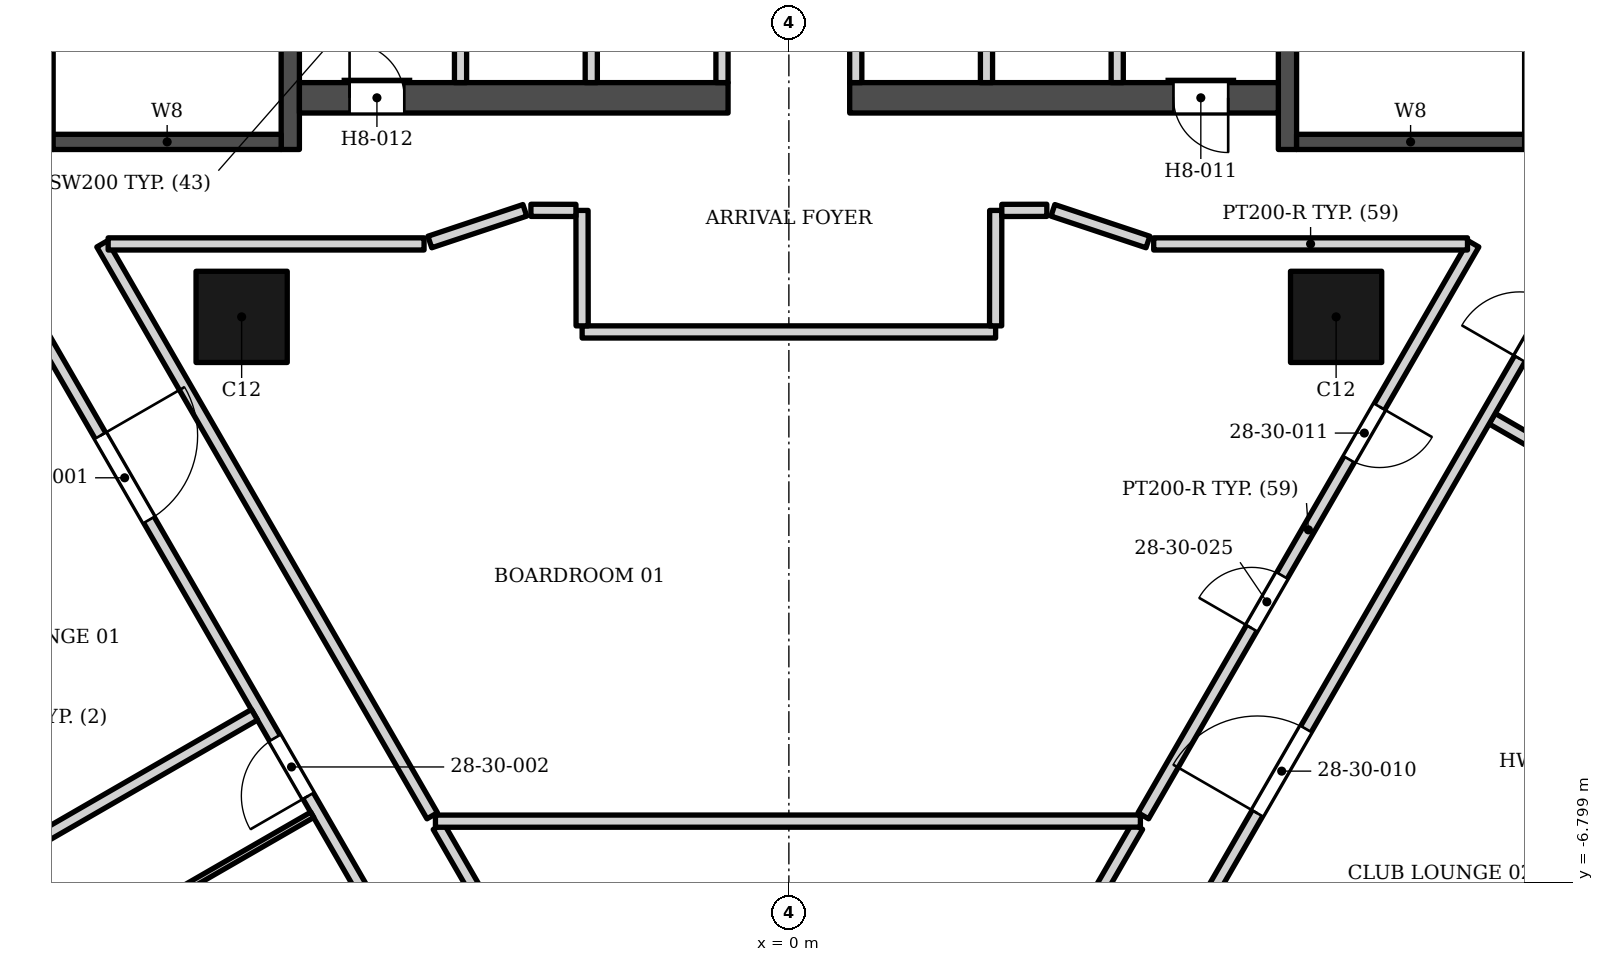
"""IFC4 building model, lengths in metres.
Left out: names, types, materials, properties, quantities, classifications, styles, units other than length and angle.
Written with IfcOpenShell. Run it as: python <this file> out.ifc"""

import sys

from ifc_helpers import new_model, si_unit, direction, frame, frame_2d, origin, origin_2d, place, context, subcontext, project, spatial, rectangle, extrude, element, fill, save


model = new_model("IFC4")
c1 = context("Model", 3, precision=1e-05, world=origin(), true_north=direction((0.0, 1.0)))
c2 = subcontext(c1, "Body", "Model", "MODEL_VIEW")
j1 = project(units=[si_unit("LENGTHUNIT", "METRE"), si_unit("PLANEANGLEUNIT", "RADIAN")], contexts=[c1])
p1 = place(None, origin())
s1 = spatial("IfcSite", under=j1, at=p1, CompositionType="ELEMENT")
p2 = place(p1, origin())
s2 = spatial("IfcBuilding", under=s1, at=p2, CompositionType="ELEMENT")
p3 = place(p2, frame((0.0, 0.0, 122.4)))
s3 = spatial("IfcBuildingStorey", under=s2, at=p3, CompositionType="ELEMENT", Elevation=122.4)
p4 = place(p3, frame((-12.35, 5.253, 0.0), z_axis=(0.0, 0.0, 1.0), x_axis=(0.0, 1.0, 0.0)))
e1 = element("IfcWall", 1, at=p4, inside=s3, PredefinedType="SHEAR", context=c2, shape_type="SweptSolid", body=[
    extrude(rectangle(XDim=13.3, YDim=0.5, at=frame_2d((6.65, 0.0))), origin(), (0.0, 0.0, 1.0), 3.4),
])
p5 = place(p3, frame((-8.2, 5.253, 0.0), z_axis=(0.0, 0.0, 1.0), x_axis=(0.0, 1.0, 0.0)))
e2 = element("IfcWall", 2, at=p5, inside=s3, PredefinedType="SHEAR", context=c2, shape_type="SweptSolid", body=[
    extrude(rectangle(XDim=13.3, YDim=0.3, at=frame_2d((6.65, 0.0))), origin(), (0.0, 0.0, 1.0), 3.4),
])
p6 = place(p5, frame((7.1, 0.0, 0.0)))
e3 = element("IfcOpeningElement", 3, at=p6, cuts=e2, PredefinedType="OPENING", context=c2, shape_type="SweptSolid", body=[
    extrude(rectangle(XDim=1.4, YDim=2.1, at=frame_2d((0.7, 1.05))), frame((0.0, 0.16, 0.0), z_axis=(0.0, -1.0, 0.0), x_axis=(1.0, 0.0, 0.0)), (0.0, 0.0, 1.0), 0.32),
])
p7 = place(p5, frame((5.05, 0.0, 0.0)))
e4 = element("IfcOpeningElement", 4, at=p7, cuts=e2, PredefinedType="OPENING", context=c2, shape_type="SweptSolid", body=[
    extrude(rectangle(XDim=1.4, YDim=2.1, at=frame_2d((0.7, 1.05))), frame((0.0, 0.16, 0.0), z_axis=(0.0, -1.0, 0.0), x_axis=(1.0, 0.0, 0.0)), (0.0, 0.0, 1.0), 0.32),
])
p8 = place(p3, frame((-12.1, 5.378, 0.0), z_axis=(0.0, 0.0, 1.0), x_axis=(1.0, 0.0, 0.0)))
e5 = element("IfcWall", 5, at=p8, inside=s3, PredefinedType="SHEAR", context=c2, shape_type="SweptSolid", body=[
    extrude(rectangle(XDim=3.75, YDim=0.25, at=frame_2d((1.875, 0.0))), origin(), (0.0, 0.0, 1.0), 3.4),
])
p9 = place(p3, frame((8.2, 5.253, 0.0), z_axis=(0.0, 0.0, 1.0), x_axis=(0.0, 1.0, 0.0)))
e6 = element("IfcWall", 6, at=p9, inside=s3, PredefinedType="SHEAR", context=c2, shape_type="SweptSolid", body=[
    extrude(rectangle(XDim=13.3, YDim=0.3, at=frame_2d((6.65, 0.0))), origin(), (0.0, 0.0, 1.0), 3.4),
])
p10 = place(p9, frame((7.1, 0.0, 0.0)))
e7 = element("IfcOpeningElement", 7, at=p10, cuts=e6, PredefinedType="OPENING", context=c2, shape_type="SweptSolid", body=[
    extrude(rectangle(XDim=1.4, YDim=2.1, at=frame_2d((0.7, 1.05))), frame((0.0, 0.16, 0.0), z_axis=(0.0, -1.0, 0.0), x_axis=(1.0, 0.0, 0.0)), (0.0, 0.0, 1.0), 0.32),
])
p11 = place(p9, frame((5.05, 0.0, 0.0)))
e8 = element("IfcOpeningElement", 8, at=p11, cuts=e6, PredefinedType="OPENING", context=c2, shape_type="SweptSolid", body=[
    extrude(rectangle(XDim=1.4, YDim=2.1, at=frame_2d((0.7, 1.05))), frame((0.0, 0.16, 0.0), z_axis=(0.0, -1.0, 0.0), x_axis=(1.0, 0.0, 0.0)), (0.0, 0.0, 1.0), 0.32),
])
p12 = place(p3, frame((8.35, 5.378, 0.0), z_axis=(0.0, 0.0, 1.0), x_axis=(1.0, 0.0, 0.0)))
e9 = element("IfcWall", 9, at=p12, inside=s3, PredefinedType="SHEAR", context=c2, shape_type="SweptSolid", body=[
    extrude(rectangle(XDim=3.75, YDim=0.25, at=frame_2d((1.875, 0.0))), origin(), (0.0, 0.0, 1.0), 3.4),
])
p13 = place(p3, frame((-8.05, 6.103, 0.0), z_axis=(0.0, 0.0, 1.0), x_axis=(1.0, 0.0, 0.0)))
e10 = element("IfcWall", 10, at=p13, inside=s3, PredefinedType="SHEAR", context=c2, shape_type="SweptSolid", body=[
    extrude(rectangle(XDim=7.05, YDim=0.5, at=frame_2d((3.525, 0.0))), origin(), (0.0, 0.0, 1.0), 3.4),
])
p14 = place(p13, frame((0.825, 0.0, 0.0)))
e11 = element("IfcOpeningElement", 11, at=p14, cuts=e10, PredefinedType="OPENING", context=c2, shape_type="SweptSolid", body=[
    extrude(rectangle(XDim=0.9, YDim=2.1, at=frame_2d((0.45, 1.05))), frame((0.0, 0.26, 0.0), z_axis=(0.0, -1.0, 0.0), x_axis=(1.0, 0.0, 0.0)), (0.0, 0.0, 1.0), 0.52),
])
p15 = place(p3, frame((1.0, 6.103, 0.0), z_axis=(0.0, 0.0, 1.0), x_axis=(1.0, 0.0, 0.0)))
e12 = element("IfcWall", 12, at=p15, inside=s3, PredefinedType="SHEAR", context=c2, shape_type="SweptSolid", body=[
    extrude(rectangle(XDim=7.05, YDim=0.5, at=frame_2d((3.525, 0.0))), origin(), (0.0, 0.0, 1.0), 3.4),
])
p16 = place(p15, frame((5.325, 0.0, 0.0)))
e13 = element("IfcOpeningElement", 13, at=p16, cuts=e12, PredefinedType="OPENING", context=c2, shape_type="SweptSolid", body=[
    extrude(rectangle(XDim=0.9, YDim=2.1, at=frame_2d((0.45, 1.05))), frame((0.0, 0.26, 0.0), z_axis=(0.0, -1.0, 0.0), x_axis=(1.0, 0.0, 0.0)), (0.0, 0.0, 1.0), 0.52),
])
for number, where, z_axis, x_axis in (
    (14, (-9.0, 2.5, 0.0), (0.0, 0.0, 1.0), (1.0, 0.0, 0.0)),
    (15, (9.0, 2.5, 0.0), (0.0, 0.0, 1.0), (1.0, 0.0, 0.0)),
):
    element("IfcColumn", number, at=place(p3, frame(where, z_axis=z_axis, x_axis=x_axis)), inside=s3, PredefinedType="COLUMN", context=c2, shape_type="SweptSolid", body=[
        extrude(rectangle(XDim=1.5, YDim=1.5, at=origin_2d()), origin(), (0.0, 0.0, 1.0), 3.4),
    ])
p17 = place(p3, frame((-13.304, -6.821, 0.0), z_axis=(0.0, 0.0, 1.0), x_axis=(0.500027713859, -0.866009402589, 0.0)))
e16 = element("IfcWall", 16, at=p17, inside=s3, PredefinedType="ELEMENTEDWALL", context=c2, shape_type="SweptSolid", body=[
    extrude(rectangle(XDim=4.2, YDim=0.2, at=frame_2d((2.1, 0.0))), origin(), (0.0, 0.0, 1.0), 2.242),
])
p18 = place(p17, frame((0.3, 0.0, 0.6)))
e17 = element("IfcOpeningElement", 17, at=p18, cuts=e16, PredefinedType="OPENING", context=c2, shape_type="SweptSolid", body=[
    extrude(rectangle(XDim=2.1, YDim=1.54, at=frame_2d((1.05, 0.77))), frame((0.0, 0.11, 0.0), z_axis=(0.0, -1.0, 0.0), x_axis=(1.0, 0.0, 0.0)), (0.0, 0.0, 1.0), 0.22),
])
p19 = place(p17, frame((2.7, 0.0, 0.0)))
e18 = element("IfcOpeningElement", 18, at=p19, cuts=e16, PredefinedType="OPENING", context=c2, shape_type="SweptSolid", body=[
    extrude(rectangle(XDim=1.2, YDim=2.14, at=frame_2d((0.6, 1.07))), frame((0.0, 0.11, 0.0), z_axis=(0.0, -1.0, 0.0), x_axis=(1.0, 0.0, 0.0)), (0.0, 0.0, 1.0), 0.22),
])
for number, where, z_axis, x_axis in (
    (19, (-5.4, 6.353, 0.0), (0.0, 0.0, 1.0), (0.0, 1.0, 0.0)),
    (20, (-3.25, 6.353, 0.0), (0.0, 0.0, 1.0), (0.0, 1.0, 0.0)),
    (21, (-1.1, 6.353, 0.0), (0.0, 0.0, 1.0), (0.0, 1.0, 0.0)),
    (22, (1.1, 6.353, 0.0), (0.0, 0.0, 1.0), (0.0, 1.0, 0.0)),
    (23, (3.25, 6.353, 0.0), (0.0, 0.0, 1.0), (0.0, 1.0, 0.0)),
    (24, (5.4, 6.353, 0.0), (0.0, 0.0, 1.0), (0.0, 1.0, 0.0)),
):
    element("IfcWall", number, at=place(p3, frame(where, z_axis=z_axis, x_axis=x_axis)), inside=s3, PredefinedType="SOLIDWALL", context=c2, shape_type="SweptSolid", body=[
        extrude(rectangle(XDim=2.5, YDim=0.2, at=frame_2d((1.25, 0.0))), origin(), (0.0, 0.0, 1.0), 3.23),
    ])
p20 = place(p3, frame((1.647, -12.948, 0.0), z_axis=(0.0, 0.0, 1.0), x_axis=(0.500209850425, 0.865904212681, 0.0)))
e25 = element("IfcWall", 25, at=p20, inside=s3, PredefinedType="PARTITIONING", context=c2, shape_type="SweptSolid", body=[
    extrude(rectangle(XDim=8.166, YDim=0.2, at=frame_2d((4.083, 0.0))), origin(), (0.0, 0.0, 1.0), 2.242),
])
p21 = place(p20, frame((3.682, 0.0, 0.0)))
e26 = element("IfcOpeningElement", 26, at=p21, cuts=e25, PredefinedType="OPENING", context=c2, shape_type="SweptSolid", body=[
    extrude(rectangle(XDim=0.9, YDim=2.1, at=frame_2d((0.45, 1.05))), frame((0.0, 0.11, 0.0), z_axis=(0.0, -1.0, 0.0), x_axis=(1.0, 0.0, 0.0)), (0.0, 0.0, 1.0), 0.22),
])
p22 = place(p3, frame((-13.143, 3.7, 0.0), z_axis=(0.0, 0.0, 1.0), x_axis=(0.499816656841, -0.866131231133, 0.0)))
e27 = element("IfcWall", 27, at=p22, inside=s3, PredefinedType="PARTITIONING", context=c2, shape_type="SweptSolid", body=[
    extrude(rectangle(XDim=15.48, YDim=0.2, at=frame_2d((7.74, 0.0))), origin(), (0.0, 0.0, 1.0), 2.242),
])
p23 = place(p22, frame((3.64, 0.0, 0.0)))
e28 = element("IfcOpeningElement", 28, at=p23, cuts=e27, PredefinedType="OPENING", context=c2, shape_type="SweptSolid", body=[
    extrude(rectangle(XDim=1.6, YDim=2.1, at=frame_2d((0.8, 1.05))), frame((0.0, 0.11, 0.0), z_axis=(0.0, -1.0, 0.0), x_axis=(1.0, 0.0, 0.0)), (0.0, 0.0, 1.0), 0.22),
])
p24 = place(p22, frame((9.381, 0.0, 0.0)))
e29 = element("IfcOpeningElement", 29, at=p24, cuts=e27, PredefinedType="OPENING", context=c2, shape_type="SweptSolid", body=[
    extrude(rectangle(XDim=1.1, YDim=2.1, at=frame_2d((0.55, 1.05))), frame((0.0, 0.11, 0.0), z_axis=(0.0, -1.0, 0.0), x_axis=(1.0, 0.0, 0.0)), (0.0, 0.0, 1.0), 0.22),
])
p25 = place(p3, frame((-5.763, -5.88, 0.0), z_axis=(0.0, 0.0, 1.0), x_axis=(0.500006842847, -0.866021453029, 0.0)))
e30 = element("IfcWall", 30, at=p25, inside=s3, PredefinedType="PARTITIONING", context=c2, shape_type="SweptSolid", body=[
    extrude(rectangle(XDim=11.493, YDim=0.2, at=frame_2d((5.747, 0.0))), origin(), (0.0, 0.0, 1.0), 2.242),
])
p26 = place(p25, frame((6.914, 0.0, 0.0)))
e31 = element("IfcOpeningElement", 31, at=p26, cuts=e30, PredefinedType="OPENING", context=c2, shape_type="SweptSolid", body=[
    extrude(rectangle(XDim=0.9, YDim=2.1, at=frame_2d((0.45, 1.05))), frame((0.0, 0.11, 0.0), z_axis=(0.0, -1.0, 0.0), x_axis=(1.0, 0.0, 0.0)), (0.0, 0.0, 1.0), 0.22),
])
p27 = place(p3, frame((-5.812, -5.793, 0.0), z_axis=(0.0, 0.0, 1.0), x_axis=(0.999999989135, 0.000147408763, 0.0)))
e32 = element("IfcWall", 32, at=p27, inside=s3, PredefinedType="PARTITIONING", context=c2, shape_type="SweptSolid", body=[
    extrude(rectangle(XDim=11.594, YDim=0.2, at=frame_2d((5.797, 0.0))), origin(), (0.0, 0.0, 1.0), 3.23),
])
p28 = place(p3, frame((5.829, -5.705, 0.0), z_axis=(0.0, 0.0, 1.0), x_axis=(0.500142759665, 0.865942965763, 0.0)))
e33 = element("IfcWall", 33, at=p28, inside=s3, PredefinedType="PARTITIONING", context=c2, shape_type="SweptSolid", body=[
    extrude(rectangle(XDim=10.86, YDim=0.2, at=frame_2d((5.43, 0.0))), origin(), (0.0, 0.0, 1.0), 2.242),
])
p29 = place(p28, frame((6.768, 0.0, 0.0)))
e34 = element("IfcOpeningElement", 34, at=p29, cuts=e33, PredefinedType="OPENING", context=c2, shape_type="SweptSolid", body=[
    extrude(rectangle(XDim=1.0, YDim=2.1, at=frame_2d((0.5, 1.05))), frame((0.0, 0.11, 0.0), z_axis=(0.0, -1.0, 0.0), x_axis=(1.0, 0.0, 0.0)), (0.0, 0.0, 1.0), 0.22),
])
p30 = place(p28, frame((3.563, 0.0, 0.0)))
e35 = element("IfcOpeningElement", 35, at=p30, cuts=e33, PredefinedType="OPENING", context=c2, shape_type="SweptSolid", body=[
    extrude(rectangle(XDim=1.0, YDim=2.1, at=frame_2d((0.5, 1.05))), frame((0.0, 0.11, 0.0), z_axis=(0.0, -1.0, 0.0), x_axis=(1.0, 0.0, 0.0)), (0.0, 0.0, 1.0), 0.22),
])
p31 = place(p3, frame((-10.351, -7.137, 0.0), z_axis=(0.0, 0.0, 1.0), x_axis=(0.86625706142, 0.499598542372, 0.0)))
e36 = element("IfcWall", 36, at=p31, inside=s3, PredefinedType="PARTITIONING", context=c2, shape_type="SweptSolid", body=[
    extrude(rectangle(XDim=2.9, YDim=0.1, at=frame_2d((1.45, 0.0))), origin(), (0.0, 0.0, 1.0), 2.474),
])
p32 = place(p3, frame((-12.99, -6.466, 0.0), z_axis=(0.0, 0.0, 1.0), x_axis=(0.866209889287, 0.49968032551, 0.0)))
e37 = element("IfcWall", 37, at=p32, inside=s3, PredefinedType="PARTITIONING", context=c2, shape_type="SweptSolid", body=[
    extrude(rectangle(XDim=4.85, YDim=0.2, at=frame_2d((2.425, 0.0))), origin(), (0.0, 0.0, 1.0), 2.242),
])
p33 = place(p3, frame((11.566, 0.826, 0.0), z_axis=(0.0, 0.0, 1.0), x_axis=(0.866318662666, -0.499491716364, 0.0)))
e38 = element("IfcWall", 38, at=p33, inside=s3, PredefinedType="PARTITIONING", context=c2, shape_type="SweptSolid", body=[
    extrude(rectangle(XDim=5.099, YDim=0.2, at=frame_2d((2.55, 0.0))), origin(), (0.0, 0.0, 1.0), 2.308),
])
p34 = place(p3, frame((-3.4, 2.252, 0.0), z_axis=(0.0, 0.0, 1.0), x_axis=(1.0, 0.0, 0.0)))
e39 = element("IfcWall", 39, at=p34, inside=s3, PredefinedType="PARTITIONING", context=c2, shape_type="SweptSolid", body=[
    extrude(rectangle(XDim=6.8, YDim=0.2, at=frame_2d((3.4, 0.0))), origin(), (0.0, 0.0, 1.0), 2.242),
])
p35 = place(p3, frame((-3.402, 4.25, 0.0), z_axis=(0.0, 0.0, 1.0), x_axis=(0.001028938362, -0.999999470643, 0.0)))
e40 = element("IfcWall", 40, at=p35, inside=s3, PredefinedType="PARTITIONING", context=c2, shape_type="SweptSolid", body=[
    extrude(rectangle(XDim=1.898, YDim=0.2, at=frame_2d((0.949, 0.0))), origin(), (0.0, 0.0, 1.0), 3.23),
])
p36 = place(p3, frame((-11.295, 3.7, 0.0), z_axis=(0.0, 0.0, 1.0), x_axis=(0.500007885066, -0.866020851292, 0.0)))
e41 = element("IfcWall", 41, at=p36, inside=s3, PredefinedType="PARTITIONING", context=c2, shape_type="SweptSolid", body=[
    extrude(rectangle(XDim=10.859, YDim=0.2, at=frame_2d((5.43, 0.0))), origin(), (0.0, 0.0, 1.0), 2.242),
])
p37 = place(p3, frame((-11.195, 3.7, 0.0), z_axis=(0.0, 0.0, 1.0), x_axis=(1.0, 0.0, 0.0)))
e42 = element("IfcWall", 42, at=p37, inside=s3, PredefinedType="PARTITIONING", context=c2, shape_type="SweptSolid", body=[
    extrude(rectangle(XDim=5.195, YDim=0.2, at=frame_2d((2.598, 0.0))), origin(), (0.0, 0.0, 1.0), 2.242),
])
p38 = place(p3, frame((6.0, 3.7, 0.0), z_axis=(0.0, 0.0, 1.0), x_axis=(1.0, 0.0, 0.0)))
e43 = element("IfcWall", 43, at=p38, inside=s3, PredefinedType="PARTITIONING", context=c2, shape_type="SweptSolid", body=[
    extrude(rectangle(XDim=5.161, YDim=0.2, at=frame_2d((2.581, 0.0))), origin(), (0.0, 0.0, 1.0), 2.242),
])
p39 = place(p3, frame((0.23, -18.61, 0.0), z_axis=(0.0, 0.0, 1.0), x_axis=(0.499999197515, 0.866025867099, 0.0)))
e44 = element("IfcWall", 44, at=p39, inside=s3, PredefinedType="PARTITIONING", context=c2, shape_type="SweptSolid", body=[
    extrude(rectangle(XDim=25.76, YDim=0.2, at=frame_2d((12.88, 0.0))), origin(), (0.0, 0.0, 1.0), 2.242),
])
p40 = place(p39, frame((0.8, 0.0, 0.0)))
e45 = element("IfcOpeningElement", 45, at=p40, cuts=e44, PredefinedType="OPENING", context=c2, shape_type="SweptSolid", body=[
    extrude(rectangle(XDim=1.1, YDim=2.1, at=frame_2d((0.55, 1.05))), frame((0.0, 0.11, 0.0), z_axis=(0.0, -1.0, 0.0), x_axis=(1.0, 0.0, 0.0)), (0.0, 0.0, 1.0), 0.22),
])
p41 = place(p39, frame((14.95, 0.0, 0.0)))
e46 = element("IfcOpeningElement", 46, at=p41, cuts=e44, PredefinedType="OPENING", context=c2, shape_type="SweptSolid", body=[
    extrude(rectangle(XDim=1.6, YDim=2.1, at=frame_2d((0.8, 1.05))), frame((0.0, 0.11, 0.0), z_axis=(0.0, -1.0, 0.0), x_axis=(1.0, 0.0, 0.0)), (0.0, 0.0, 1.0), 0.22),
])
p42 = place(p39, frame((23.58, 0.0, 0.0)))
e47 = element("IfcOpeningElement", 47, at=p42, cuts=e44, PredefinedType="OPENING", context=c2, shape_type="SweptSolid", body=[
    extrude(rectangle(XDim=1.1, YDim=2.1, at=frame_2d((0.55, 1.05))), frame((0.0, 0.11, 0.0), z_axis=(0.0, -1.0, 0.0), x_axis=(1.0, 0.0, 0.0)), (0.0, 0.0, 1.0), 0.22),
])
for number, where, z_axis, x_axis in (
    (48, (4.342, 4.252, 0.0), (0.0, 0.0, 1.0), (0.949, -0.316, 0.0)),
    (49, (-5.905, 3.731, 0.0), (0.0, 0.0, 1.0), (0.949, 0.316, 0.0)),
):
    element("IfcWall", number, at=place(p3, frame(where, z_axis=z_axis, x_axis=x_axis)), inside=s3, PredefinedType="PARTITIONING", context=c2, shape_type="SweptSolid", body=[
        extrude(rectangle(XDim=1.647, YDim=0.2, at=frame_2d((0.824, 0.0))), origin(), (0.0, 0.0, 1.0), 2.242),
    ])
p43 = place(p3, frame((-4.242, 4.252, 0.0), z_axis=(0.0, 0.0, 1.0), x_axis=(0.999998041999, -0.001978887946, 0.0)))
e50 = element("IfcWall", 50, at=p43, inside=s3, PredefinedType="PARTITIONING", context=c2, shape_type="SweptSolid", body=[
    extrude(rectangle(XDim=0.74, YDim=0.2, at=frame_2d((0.37, 0.0))), origin(), (0.0, 0.0, 1.0), 3.23),
])
p44 = place(p3, frame((3.4, 2.352, 0.0), z_axis=(0.0, 0.0, 1.0), x_axis=(0.001028938362, 0.999999470643, 0.0)))
e51 = element("IfcWall", 51, at=p44, inside=s3, PredefinedType="PARTITIONING", context=c2, shape_type="SweptSolid", body=[
    extrude(rectangle(XDim=1.898, YDim=0.2, at=frame_2d((0.949, 0.0))), origin(), (0.0, 0.0, 1.0), 3.23),
])
p45 = place(p3, frame((3.502, 4.251, 0.0), z_axis=(0.0, 0.0, 1.0), x_axis=(0.999998041999, 0.001978887946, 0.0)))
e52 = element("IfcWall", 52, at=p45, inside=s3, PredefinedType="PARTITIONING", context=c2, shape_type="SweptSolid", body=[
    extrude(rectangle(XDim=0.74, YDim=0.2, at=frame_2d((0.37, 0.0))), origin(), (0.0, 0.0, 1.0), 3.23),
])
p46 = place(p14, origin())
e53 = element("IfcDoor", 53, at=p46, inside=s3, OperationType="SINGLE_SWING_LEFT", PredefinedType="DOOR", context=c2, shape_type="SweptSolid", body=[
    extrude(rectangle(XDim=0.9, YDim=2.1, at=frame_2d((0.45, 1.05))), frame((0.0, 0.025, 0.0), z_axis=(0.0, -1.0, 0.0), x_axis=(1.0, 0.0, 0.0)), (0.0, 0.0, 1.0), 0.05),
])
fill(e11, e53)
p47 = place(p16, origin())
e54 = element("IfcDoor", 54, at=p47, inside=s3, OperationType="SINGLE_SWING_RIGHT", PredefinedType="DOOR", context=c2, shape_type="SweptSolid", body=[
    extrude(rectangle(XDim=0.9, YDim=2.1, at=frame_2d((0.45, 1.05))), frame((0.0, 0.025, 0.0), z_axis=(0.0, -1.0, 0.0), x_axis=(1.0, 0.0, 0.0)), (0.0, 0.0, 1.0), 0.05),
])
fill(e13, e54)
p48 = place(p23, origin())
e55 = element("IfcDoor", 55, at=p48, inside=s3, OperationType="DOUBLE_DOOR_SINGLE_SWING", PredefinedType="DOOR", context=c2, shape_type="SweptSolid", body=[
    extrude(rectangle(XDim=1.6, YDim=2.1, at=frame_2d((0.8, 1.05))), frame((0.0, 0.025, 0.0), z_axis=(0.0, -1.0, 0.0), x_axis=(1.0, 0.0, 0.0)), (0.0, 0.0, 1.0), 0.05),
])
fill(e28, e55)
p49 = place(p24, origin())
e56 = element("IfcDoor", 56, at=p49, inside=s3, OperationType="SINGLE_SWING_RIGHT", PredefinedType="DOOR", context=c2, shape_type="SweptSolid", body=[
    extrude(rectangle(XDim=1.1, YDim=2.1, at=frame_2d((0.55, 1.05))), frame((0.0, 0.025, 0.0), z_axis=(0.0, -1.0, 0.0), x_axis=(1.0, 0.0, 0.0)), (0.0, 0.0, 1.0), 0.05),
])
fill(e29, e56)
p50 = place(p41, origin())
e57 = element("IfcDoor", 57, at=p50, inside=s3, OperationType="DOUBLE_DOOR_SINGLE_SWING", PredefinedType="DOOR", context=c2, shape_type="SweptSolid", body=[
    extrude(rectangle(XDim=1.6, YDim=2.1, at=frame_2d((0.8, 1.05))), frame((0.0, 0.025, 0.0), z_axis=(0.0, -1.0, 0.0), x_axis=(1.0, 0.0, 0.0)), (0.0, 0.0, 1.0), 0.05),
])
fill(e46, e57)
p51 = place(p29, origin())
e58 = element("IfcDoor", 58, at=p51, inside=s3, OperationType="SINGLE_SWING_RIGHT", PredefinedType="DOOR", context=c2, shape_type="SweptSolid", body=[
    extrude(rectangle(XDim=1.0, YDim=2.1, at=frame_2d((0.5, 1.05))), frame((0.0, 0.025, 0.0), z_axis=(0.0, -1.0, 0.0), x_axis=(1.0, 0.0, 0.0)), (0.0, 0.0, 1.0), 0.05),
])
fill(e34, e58)
p52 = place(p42, origin())
e59 = element("IfcDoor", 59, at=p52, inside=s3, OperationType="SINGLE_SWING_LEFT", PredefinedType="DOOR", context=c2, shape_type="SweptSolid", body=[
    extrude(rectangle(XDim=1.1, YDim=2.1, at=frame_2d((0.55, 1.05))), frame((0.0, 0.025, 0.0), z_axis=(0.0, -1.0, 0.0), x_axis=(1.0, 0.0, 0.0)), (0.0, 0.0, 1.0), 0.05),
])
fill(e47, e59)
p53 = place(p30, origin())
e60 = element("IfcDoor", 60, at=p53, inside=s3, OperationType="SINGLE_SWING_LEFT", PredefinedType="DOOR", context=c2, shape_type="SweptSolid", body=[
    extrude(rectangle(XDim=1.0, YDim=2.1, at=frame_2d((0.5, 1.05))), frame((0.0, 0.025, 0.0), z_axis=(0.0, -1.0, 0.0), x_axis=(1.0, 0.0, 0.0)), (0.0, 0.0, 1.0), 0.05),
])
fill(e35, e60)
save(model, sys.argv[1])
